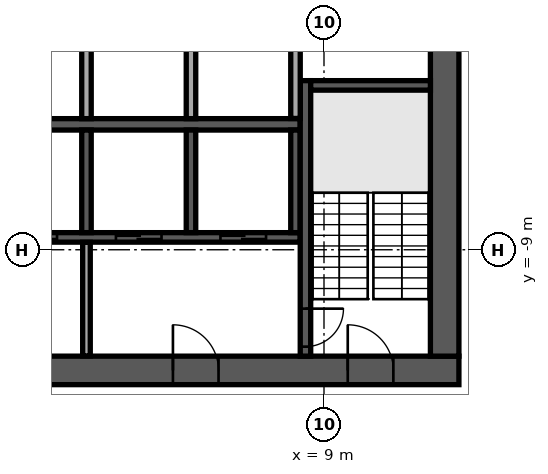
"""IFC4 building model, lengths in metres.
Left out: names, types, materials, properties, quantities, classifications, styles, units other than length and angle.
Written with IfcOpenShell. Run it as: python <this file> out.ifc"""

import sys

from ifc_helpers import new_model, si_unit, direction, frame, frame_2d, origin, place, context, subcontext, project, spatial, rectangle, extrude, element, fill, save


model = new_model("IFC4")
c1 = context("Model", 3, precision=1e-05, world=origin(), true_north=direction((0.0, 1.0)))
c2 = subcontext(c1, "Body", "Model", "MODEL_VIEW")
j1 = project(units=[si_unit("LENGTHUNIT", "METRE"), si_unit("PLANEANGLEUNIT", "RADIAN")], contexts=[c1])
p1 = place(None, origin())
s1 = spatial("IfcSite", under=j1, at=p1, CompositionType="ELEMENT")
p2 = place(p1, origin())
s2 = spatial("IfcBuilding", under=s1, at=p2, CompositionType="ELEMENT")
p3 = place(p2, frame((0.0, 0.0, 262.9)))
s3 = spatial("IfcBuildingStorey", under=s2, at=p3, CompositionType="ELEMENT", Elevation=262.9)
p4 = place(p3, frame((-12.55, -12.175, 0.0), z_axis=(0.0, 0.0, 1.0), x_axis=(1.0, 0.0, 0.0)))
e1 = element("IfcWall", 1, at=p4, inside=s3, PredefinedType="SHEAR", context=c2, shape_type="SweptSolid", body=[
    extrude(rectangle(XDim=25.1, YDim=0.75, at=frame_2d((12.55, 0.0))), origin(), (0.0, 0.0, 1.0), 3.64),
])
p5 = place(p4, frame((7.45, 0.0, 0.0)))
e2 = element("IfcOpeningElement", 2, at=p5, cuts=e1, PredefinedType="OPENING", context=c2, shape_type="SweptSolid", body=[
    extrude(rectangle(XDim=2.0, YDim=2.1, at=frame_2d((1.0, 1.05))), frame((0.0, 0.385, 0.0), z_axis=(0.0, -1.0, 0.0), x_axis=(1.0, 0.0, 0.0)), (0.0, 0.0, 1.0), 0.77),
])
p6 = place(p4, frame((17.575, 0.0, 0.0)))
e3 = element("IfcOpeningElement", 3, at=p6, cuts=e1, PredefinedType="OPENING", context=c2, shape_type="SweptSolid", body=[
    extrude(rectangle(XDim=1.2, YDim=2.1, at=frame_2d((0.6, 1.05))), frame((0.0, 0.385, 0.0), z_axis=(0.0, -1.0, 0.0), x_axis=(1.0, 0.0, 0.0)), (0.0, 0.0, 1.0), 0.77),
])
p7 = place(p4, frame((1.725, 0.0, 0.0)))
e4 = element("IfcOpeningElement", 4, at=p7, cuts=e1, PredefinedType="OPENING", context=c2, shape_type="SweptSolid", body=[
    extrude(rectangle(XDim=1.2, YDim=2.1, at=frame_2d((0.6, 1.05))), frame((0.0, 0.385, 0.0), z_axis=(0.0, -1.0, 0.0), x_axis=(1.0, 0.0, 0.0)), (0.0, 0.0, 1.0), 0.77),
])
p8 = place(p4, frame((22.175, 0.0, 0.0)))
e5 = element("IfcOpeningElement", 5, at=p8, cuts=e1, PredefinedType="OPENING", context=c2, shape_type="SweptSolid", body=[
    extrude(rectangle(XDim=1.2, YDim=2.1, at=frame_2d((0.6, 1.05))), frame((0.0, 0.385, 0.0), z_axis=(0.0, -1.0, 0.0), x_axis=(1.0, 0.0, 0.0)), (0.0, 0.0, 1.0), 0.77),
])
p9 = place(p3, frame((12.175, -11.8, 0.0), z_axis=(0.0, 0.0, 1.0), x_axis=(0.0, 1.0, 0.0)))
e6 = element("IfcWall", 6, at=p9, inside=s3, PredefinedType="SHEAR", context=c2, shape_type="SweptSolid", body=[
    extrude(rectangle(XDim=23.6, YDim=0.75, at=frame_2d((11.8, 0.0))), origin(), (0.0, 0.0, 1.0), 3.64),
])
p10 = place(p9, frame((10.6, 0.0, 0.0)))
e7 = element("IfcOpeningElement", 7, at=p10, cuts=e6, PredefinedType="OPENING", context=c2, shape_type="SweptSolid", body=[
    extrude(rectangle(XDim=2.4, YDim=2.4, at=frame_2d((1.2, 1.2))), frame((0.0, 0.385, 0.0), z_axis=(0.0, -1.0, 0.0), x_axis=(1.0, 0.0, 0.0)), (0.0, 0.0, 1.0), 0.77),
])
p11 = place(p3, frame((-2.875, -5.7, 0.0), z_axis=(0.0, 0.0, 1.0), x_axis=(1.0, 0.0, 0.0)))
e8 = element("IfcWall", 8, at=p11, inside=s3, PredefinedType="SOLIDWALL", context=c2, shape_type="SweptSolid", body=[
    extrude(rectangle(XDim=11.25, YDim=0.3, at=frame_2d((5.625, 0.0))), origin(), (0.0, 0.0, 1.0), 3.64),
])
for number, where, z_axis, x_axis in (
    (9, (2.75, -5.55, 0.0), (0.0, 0.0, 1.0), (0.0, 1.0, 0.0)),
    (10, (5.5, -5.55, 0.0), (0.0, 0.0, 1.0), (0.0, 1.0, 0.0)),
):
    element("IfcWall", number, at=place(p3, frame(where, z_axis=z_axis, x_axis=x_axis)), inside=s3, PredefinedType="SOLIDWALL", context=c2, shape_type="SweptSolid", body=[
        extrude(rectangle(XDim=2.7, YDim=0.25, at=frame_2d((1.35, 0.0))), origin(), (0.0, 0.0, 1.0), 3.64),
    ])
p12 = place(p3, frame((-2.875, -8.675, 0.0), z_axis=(0.0, 0.0, 1.0), x_axis=(1.0, 0.0, 0.0)))
e11 = element("IfcWall", 11, at=p12, inside=s3, PredefinedType="SOLIDWALL", context=c2, shape_type="SweptSolid", body=[
    extrude(rectangle(XDim=11.25, YDim=0.25, at=frame_2d((5.625, 0.0))), origin(), (0.0, 0.0, 1.0), 3.64),
])
p13 = place(p12, frame((0.9, 0.0, 0.0)))
e12 = element("IfcOpeningElement", 12, at=p13, cuts=e11, PredefinedType="OPENING", context=c2, shape_type="SweptSolid", body=[
    extrude(rectangle(XDim=1.2, YDim=2.1, at=frame_2d((0.6, 1.05))), frame((0.0, 0.135, 0.0), z_axis=(0.0, -1.0, 0.0), x_axis=(1.0, 0.0, 0.0)), (0.0, 0.0, 1.0), 0.27),
])
p14 = place(p12, frame((3.65, 0.0, 0.0)))
e13 = element("IfcOpeningElement", 13, at=p14, cuts=e11, PredefinedType="OPENING", context=c2, shape_type="SweptSolid", body=[
    extrude(rectangle(XDim=1.2, YDim=2.1, at=frame_2d((0.6, 1.05))), frame((0.0, 0.135, 0.0), z_axis=(0.0, -1.0, 0.0), x_axis=(1.0, 0.0, 0.0)), (0.0, 0.0, 1.0), 0.27),
])
p15 = place(p12, frame((6.4, 0.0, 0.0)))
e14 = element("IfcOpeningElement", 14, at=p15, cuts=e11, PredefinedType="OPENING", context=c2, shape_type="SweptSolid", body=[
    extrude(rectangle(XDim=1.2, YDim=2.1, at=frame_2d((0.6, 1.05))), frame((0.0, 0.135, 0.0), z_axis=(0.0, -1.0, 0.0), x_axis=(1.0, 0.0, 0.0)), (0.0, 0.0, 1.0), 0.27),
])
p16 = place(p12, frame((9.15, 0.0, 0.0)))
e15 = element("IfcOpeningElement", 15, at=p16, cuts=e11, PredefinedType="OPENING", context=c2, shape_type="SweptSolid", body=[
    extrude(rectangle(XDim=1.2, YDim=2.1, at=frame_2d((0.6, 1.05))), frame((0.0, 0.135, 0.0), z_axis=(0.0, -1.0, 0.0), x_axis=(1.0, 0.0, 0.0)), (0.0, 0.0, 1.0), 0.27),
])
for number, where, z_axis, x_axis in (
    (16, (2.75, -8.55, 0.0), (0.0, 0.0, 1.0), (0.0, 1.0, 0.0)),
    (17, (5.5, -8.55, 0.0), (0.0, 0.0, 1.0), (0.0, 1.0, 0.0)),
    (18, (8.25, -8.55, 0.0), (0.0, 0.0, 1.0), (0.0, 1.0, 0.0)),
):
    element("IfcWall", number, at=place(p3, frame(where, z_axis=z_axis, x_axis=x_axis)), inside=s3, PredefinedType="SOLIDWALL", context=c2, shape_type="SweptSolid", body=[
        extrude(rectangle(XDim=2.7, YDim=0.25, at=frame_2d((1.35, 0.0))), origin(), (0.0, 0.0, 1.0), 3.64),
    ])
p17 = place(p3, frame((8.512, -4.55, 0.0), z_axis=(0.0, 0.0, 1.0), x_axis=(0.0, -1.0, 0.0)))
e19 = element("IfcWall", 19, at=p17, inside=s3, PredefinedType="SOLIDWALL", context=c2, shape_type="SweptSolid", body=[
    extrude(rectangle(XDim=7.25, YDim=0.275, at=frame_2d((3.625, 0.0))), origin(), (0.0, 0.0, 1.0), 3.64),
])
p18 = place(p17, frame((6.0, 0.0, 0.0)))
e20 = element("IfcOpeningElement", 20, at=p18, cuts=e19, PredefinedType="OPENING", context=c2, shape_type="SweptSolid", body=[
    extrude(rectangle(XDim=1.0, YDim=2.1, at=frame_2d((0.5, 1.05))), frame((0.0, 0.147, 0.0), z_axis=(0.0, -1.0, 0.0), x_axis=(1.0, 0.0, 0.0)), (0.0, 0.0, 1.0), 0.295),
])
p19 = place(p3, frame((8.65, -4.675, 0.0), z_axis=(0.0, 0.0, 1.0), x_axis=(1.0, 0.0, 0.0)))
e21 = element("IfcWall", 21, at=p19, inside=s3, PredefinedType="SOLIDWALL", context=c2, shape_type="SweptSolid", body=[
    extrude(rectangle(XDim=3.15, YDim=0.25, at=frame_2d((1.575, 0.0))), origin(), (0.0, 0.0, 1.0), 3.64),
])
p20 = place(p3, frame((2.75, -11.795, 0.0), z_axis=(0.0, 0.0, 1.0), x_axis=(0.0, 1.0, 0.0)))
e22 = element("IfcWall", 22, at=p20, inside=s3, PredefinedType="PARTITIONING", context=c2, shape_type="SweptSolid", body=[
    extrude(rectangle(XDim=2.99, YDim=0.2, at=frame_2d((1.495, 0.0))), origin(), (0.0, 0.0, 1.0), 3.64),
])
p21 = place(p3, frame((8.25, -5.545, 0.0), z_axis=(0.0, 0.0, 1.0), x_axis=(0.0, 1.0, 0.0)))
e23 = element("IfcWall", 23, at=p21, inside=s3, PredefinedType="PARTITIONING", context=c2, shape_type="SweptSolid", body=[
    extrude(rectangle(XDim=2.69, YDim=0.25, at=frame_2d((1.345, 0.0))), origin(), (0.0, 0.0, 1.0), 3.64),
])
p22 = place(p3, frame((8.094, -32.782, 0.0), z_axis=(0.0, 0.0, 1.0), x_axis=(0.499997945818, 0.866026589763, 0.0)))
e24 = element("IfcWall", 24, at=p22, inside=s3, PredefinedType="STANDARD", context=c2, shape_type="SweptSolid", body=[
    extrude(rectangle(XDim=48.686, YDim=0.6, at=frame_2d((24.343, 0.0))), origin(), (0.0, 0.0, 1.0), 3.64),
])
p23 = place(p22, frame((1.213, 0.0, 0.9)))
e25 = element("IfcOpeningElement", 25, at=p23, cuts=e24, PredefinedType="OPENING", context=c2, shape_type="SweptSolid", body=[
    extrude(rectangle(XDim=2.0, YDim=2.1, at=frame_2d((1.0, 1.05))), frame((0.0, 0.31, 0.0), z_axis=(0.0, -1.0, 0.0), x_axis=(1.0, 0.0, 0.0)), (0.0, 0.0, 1.0), 0.62),
])
p24 = place(p22, frame((5.639, 0.0, 0.9)))
e26 = element("IfcOpeningElement", 26, at=p24, cuts=e24, PredefinedType="OPENING", context=c2, shape_type="SweptSolid", body=[
    extrude(rectangle(XDim=2.0, YDim=2.1, at=frame_2d((1.0, 1.05))), frame((0.0, 0.31, 0.0), z_axis=(0.0, -1.0, 0.0), x_axis=(1.0, 0.0, 0.0)), (0.0, 0.0, 1.0), 0.62),
])
p25 = place(p22, frame((10.065, 0.0, 0.9)))
e27 = element("IfcOpeningElement", 27, at=p25, cuts=e24, PredefinedType="OPENING", context=c2, shape_type="SweptSolid", body=[
    extrude(rectangle(XDim=2.0, YDim=2.1, at=frame_2d((1.0, 1.05))), frame((0.0, 0.31, 0.0), z_axis=(0.0, -1.0, 0.0), x_axis=(1.0, 0.0, 0.0)), (0.0, 0.0, 1.0), 0.62),
])
p26 = place(p22, frame((14.491, 0.0, 0.9)))
e28 = element("IfcOpeningElement", 28, at=p26, cuts=e24, PredefinedType="OPENING", context=c2, shape_type="SweptSolid", body=[
    extrude(rectangle(XDim=2.0, YDim=2.1, at=frame_2d((1.0, 1.05))), frame((0.0, 0.31, 0.0), z_axis=(0.0, -1.0, 0.0), x_axis=(1.0, 0.0, 0.0)), (0.0, 0.0, 1.0), 0.62),
])
p27 = place(p22, frame((18.917, 0.0, 0.9)))
e29 = element("IfcOpeningElement", 29, at=p27, cuts=e24, PredefinedType="OPENING", context=c2, shape_type="SweptSolid", body=[
    extrude(rectangle(XDim=2.0, YDim=2.1, at=frame_2d((1.0, 1.05))), frame((0.0, 0.31, 0.0), z_axis=(0.0, -1.0, 0.0), x_axis=(1.0, 0.0, 0.0)), (0.0, 0.0, 1.0), 0.62),
])
p28 = place(p22, frame((23.343, 0.0, 0.9)))
e30 = element("IfcOpeningElement", 30, at=p28, cuts=e24, PredefinedType="OPENING", context=c2, shape_type="SweptSolid", body=[
    extrude(rectangle(XDim=2.0, YDim=2.1, at=frame_2d((1.0, 1.05))), frame((0.0, 0.31, 0.0), z_axis=(0.0, -1.0, 0.0), x_axis=(1.0, 0.0, 0.0)), (0.0, 0.0, 1.0), 0.62),
])
p29 = place(p22, frame((27.769, 0.0, 0.9)))
e31 = element("IfcOpeningElement", 31, at=p29, cuts=e24, PredefinedType="OPENING", context=c2, shape_type="SweptSolid", body=[
    extrude(rectangle(XDim=2.0, YDim=2.1, at=frame_2d((1.0, 1.05))), frame((0.0, 0.31, 0.0), z_axis=(0.0, -1.0, 0.0), x_axis=(1.0, 0.0, 0.0)), (0.0, 0.0, 1.0), 0.62),
])
p30 = place(p22, frame((32.195, 0.0, 0.9)))
e32 = element("IfcOpeningElement", 32, at=p30, cuts=e24, PredefinedType="OPENING", context=c2, shape_type="SweptSolid", body=[
    extrude(rectangle(XDim=2.0, YDim=2.1, at=frame_2d((1.0, 1.05))), frame((0.0, 0.31, 0.0), z_axis=(0.0, -1.0, 0.0), x_axis=(1.0, 0.0, 0.0)), (0.0, 0.0, 1.0), 0.62),
])
p31 = place(p22, frame((36.621, 0.0, 0.9)))
e33 = element("IfcOpeningElement", 33, at=p31, cuts=e24, PredefinedType="OPENING", context=c2, shape_type="SweptSolid", body=[
    extrude(rectangle(XDim=2.0, YDim=2.1, at=frame_2d((1.0, 1.05))), frame((0.0, 0.31, 0.0), z_axis=(0.0, -1.0, 0.0), x_axis=(1.0, 0.0, 0.0)), (0.0, 0.0, 1.0), 0.62),
])
p32 = place(p22, frame((41.047, 0.0, 0.9)))
e34 = element("IfcOpeningElement", 34, at=p32, cuts=e24, PredefinedType="OPENING", context=c2, shape_type="SweptSolid", body=[
    extrude(rectangle(XDim=2.0, YDim=2.1, at=frame_2d((1.0, 1.05))), frame((0.0, 0.31, 0.0), z_axis=(0.0, -1.0, 0.0), x_axis=(1.0, 0.0, 0.0)), (0.0, 0.0, 1.0), 0.62),
])
p33 = place(p22, frame((45.473, 0.0, 0.9)))
e35 = element("IfcOpeningElement", 35, at=p33, cuts=e24, PredefinedType="OPENING", context=c2, shape_type="SweptSolid", body=[
    extrude(rectangle(XDim=2.0, YDim=2.1, at=frame_2d((1.0, 1.05))), frame((0.0, 0.31, 0.0), z_axis=(0.0, -1.0, 0.0), x_axis=(1.0, 0.0, 0.0)), (0.0, 0.0, 1.0), 0.62),
])
p34 = place(p3, frame((-26.744, -7.073, 0.0), z_axis=(0.0, 0.0, 1.0), x_axis=(0.866020890374, -0.500007817374, 0.0)))
e36 = element("IfcWall", 36, at=p34, inside=s3, PredefinedType="PARTITIONING", context=c2, shape_type="SweptSolid", body=[
    extrude(rectangle(XDim=39.324, YDim=0.15, at=frame_2d((19.662, 0.0))), origin(), (0.0, 0.0, 1.0), 3.04),
])
p35 = place(p34, frame((14.505, 0.0, 0.0)))
e37 = element("IfcOpeningElement", 37, at=p35, cuts=e36, PredefinedType="OPENING", context=c2, shape_type="SweptSolid", body=[
    extrude(rectangle(XDim=1.0, YDim=2.1, at=frame_2d((0.5, 1.05))), frame((0.0, 0.085, 0.0), z_axis=(0.0, -1.0, 0.0), x_axis=(1.0, 0.0, 0.0)), (0.0, 0.0, 1.0), 0.17),
])
p36 = place(p34, frame((22.632, 0.0, 0.0)))
e38 = element("IfcOpeningElement", 38, at=p36, cuts=e36, PredefinedType="OPENING", context=c2, shape_type="SweptSolid", body=[
    extrude(rectangle(XDim=1.0, YDim=2.1, at=frame_2d((0.5, 1.05))), frame((0.0, 0.085, 0.0), z_axis=(0.0, -1.0, 0.0), x_axis=(1.0, 0.0, 0.0)), (0.0, 0.0, 1.0), 0.17),
])
p37 = place(p34, frame((36.852, 0.0, 0.0)))
e39 = element("IfcOpeningElement", 39, at=p37, cuts=e36, PredefinedType="OPENING", context=c2, shape_type="SweptSolid", body=[
    extrude(rectangle(XDim=1.8, YDim=2.1, at=frame_2d((0.9, 1.05))), frame((0.0, 0.085, 0.0), z_axis=(0.0, -1.0, 0.0), x_axis=(1.0, 0.0, 0.0)), (0.0, 0.0, 1.0), 0.17),
])
p38 = place(p34, frame((29.852, 0.0, 0.0)))
e40 = element("IfcOpeningElement", 40, at=p38, cuts=e36, PredefinedType="OPENING", context=c2, shape_type="SweptSolid", body=[
    extrude(rectangle(XDim=1.0, YDim=2.1, at=frame_2d((0.5, 1.05))), frame((0.0, 0.085, 0.0), z_axis=(0.0, -1.0, 0.0), x_axis=(1.0, 0.0, 0.0)), (0.0, 0.0, 1.0), 0.17),
])
p39 = place(p6, origin())
e41 = element("IfcDoor", 41, at=p39, inside=s3, OperationType="SINGLE_SWING_LEFT", PredefinedType="DOOR", context=c2, shape_type="SweptSolid", body=[
    extrude(rectangle(XDim=1.2, YDim=2.1, at=frame_2d((0.6, 1.05))), frame((0.0, 0.025, 0.0), z_axis=(0.0, -1.0, 0.0), x_axis=(1.0, 0.0, 0.0)), (0.0, 0.0, 1.0), 0.05),
])
fill(e3, e41)
p40 = place(p8, origin())
e42 = element("IfcDoor", 42, at=p40, inside=s3, OperationType="SINGLE_SWING_LEFT", PredefinedType="DOOR", context=c2, shape_type="SweptSolid", body=[
    extrude(rectangle(XDim=1.2, YDim=2.1, at=frame_2d((0.6, 1.05))), frame((0.0, 0.025, 0.0), z_axis=(0.0, -1.0, 0.0), x_axis=(1.0, 0.0, 0.0)), (0.0, 0.0, 1.0), 0.05),
])
fill(e5, e42)
p41 = place(p14, origin())
e43 = element("IfcDoor", 43, at=p41, inside=s3, OperationType="DOUBLE_DOOR_SLIDING", PredefinedType="DOOR", context=c2, shape_type="SweptSolid", body=[
    extrude(rectangle(XDim=1.2, YDim=2.1, at=frame_2d((0.6, 1.05))), frame((0.0, 0.025, 0.0), z_axis=(0.0, -1.0, 0.0), x_axis=(1.0, 0.0, 0.0)), (0.0, 0.0, 1.0), 0.05),
])
fill(e13, e43)
p42 = place(p15, origin())
e44 = element("IfcDoor", 44, at=p42, inside=s3, OperationType="DOUBLE_DOOR_SLIDING", PredefinedType="DOOR", context=c2, shape_type="SweptSolid", body=[
    extrude(rectangle(XDim=1.2, YDim=2.1, at=frame_2d((0.6, 1.05))), frame((0.0, 0.025, 0.0), z_axis=(0.0, -1.0, 0.0), x_axis=(1.0, 0.0, 0.0)), (0.0, 0.0, 1.0), 0.05),
])
fill(e14, e44)
p43 = place(p16, origin())
e45 = element("IfcDoor", 45, at=p43, inside=s3, OperationType="DOUBLE_DOOR_SLIDING", PredefinedType="DOOR", context=c2, shape_type="SweptSolid", body=[
    extrude(rectangle(XDim=1.2, YDim=2.1, at=frame_2d((0.6, 1.05))), frame((0.0, 0.025, 0.0), z_axis=(0.0, -1.0, 0.0), x_axis=(1.0, 0.0, 0.0)), (0.0, 0.0, 1.0), 0.05),
])
fill(e15, e45)
p44 = place(p18, origin())
e46 = element("IfcDoor", 46, at=p44, inside=s3, OperationType="SINGLE_SWING_LEFT", PredefinedType="DOOR", context=c2, shape_type="SweptSolid", body=[
    extrude(rectangle(XDim=1.0, YDim=2.1, at=frame_2d((0.5, 1.05))), frame((0.0, 0.025, 0.0), z_axis=(0.0, -1.0, 0.0), x_axis=(1.0, 0.0, 0.0)), (0.0, 0.0, 1.0), 0.05),
])
fill(e20, e46)
save(model, sys.argv[1])
